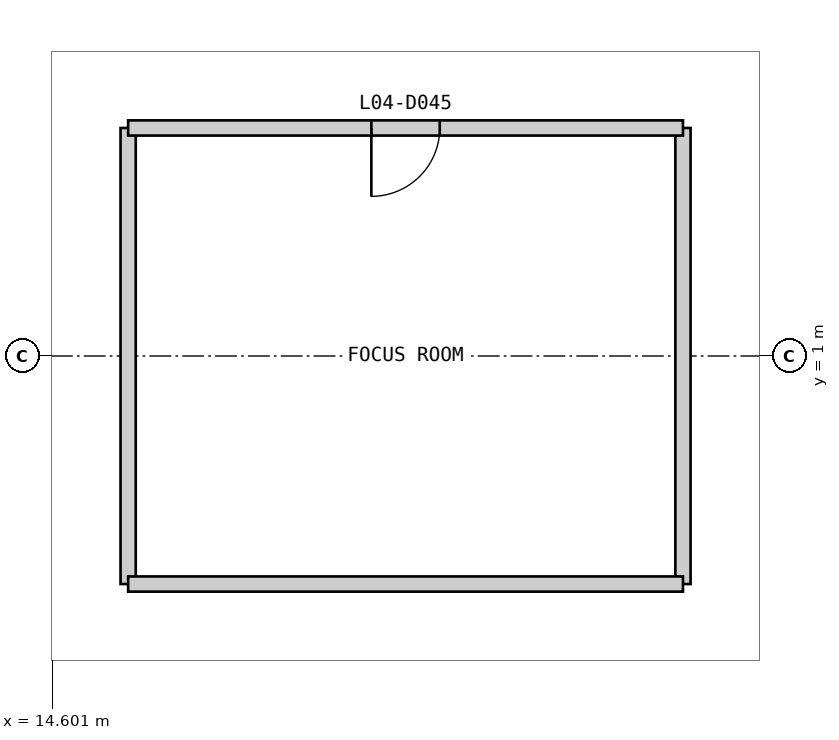
"""IFC4 building model, lengths in metres.
Left out: names, types, materials, properties, quantities, classifications, styles, units other than length and angle.
Written with IfcOpenShell. Run it as: python <this file> out.ifc"""

import sys

from ifc_helpers import new_model, si_unit, direction, frame, frame_2d, origin, place, context, subcontext, project, spatial, rectangle, extrude, element, fill, save


model = new_model("IFC4")
c1 = context("Model", 3, precision=1e-05, world=origin(), true_north=direction((0.0, 1.0)))
c2 = subcontext(c1, "Body", "Model", "MODEL_VIEW")
j1 = project(units=[si_unit("LENGTHUNIT", "METRE"), si_unit("PLANEANGLEUNIT", "RADIAN")], contexts=[c1])
p1 = place(None, origin())
s1 = spatial("IfcSite", under=j1, at=p1, CompositionType="ELEMENT")
p2 = place(p1, origin())
s2 = spatial("IfcBuilding", under=s1, at=p2, CompositionType="ELEMENT")
p3 = place(p2, frame((0.0, 0.0, 21.4)))
s3 = spatial("IfcBuildingStorey", under=s2, at=p3, CompositionType="ELEMENT", Elevation=21.4)
for number, where, z_axis, x_axis in (
    (1, (15.6, -2.0, 0.0), (0.0, 0.0, 1.0), (0.0, 1.0, 0.0)),
    (2, (22.9, -2.0, 0.0), (0.0, 0.0, 1.0), (0.0, 1.0, 0.0)),
):
    element("IfcWall", number, at=place(p3, frame(where, z_axis=z_axis, x_axis=x_axis)), inside=s3, PredefinedType="PARTITIONING", context=c2, shape_type="SweptSolid", body=[
        extrude(rectangle(XDim=6.0, YDim=0.2, at=frame_2d((3.0, 0.0))), origin(), (0.0, 0.0, 1.0), 4.5),
    ])
p4 = place(p3, frame((15.6, -2.0, 0.0), z_axis=(0.0, 0.0, 1.0), x_axis=(1.0, 0.0, 0.0)))
e3 = element("IfcWall", 3, at=p4, inside=s3, PredefinedType="PARTITIONING", context=c2, shape_type="SweptSolid", body=[
    extrude(rectangle(XDim=7.3, YDim=0.2, at=frame_2d((3.65, 0.0))), origin(), (0.0, 0.0, 1.0), 4.5),
])
p5 = place(p3, frame((15.6, 4.0, 0.0), z_axis=(0.0, 0.0, 1.0), x_axis=(1.0, 0.0, 0.0)))
e4 = element("IfcWall", 4, at=p5, inside=s3, PredefinedType="PARTITIONING", context=c2, shape_type="SweptSolid", body=[
    extrude(rectangle(XDim=7.3, YDim=0.2, at=frame_2d((3.65, 0.0))), origin(), (0.0, 0.0, 1.0), 4.5),
])
p6 = place(p5, frame((3.2, 0.0, 0.0)))
e5 = element("IfcOpeningElement", 5, at=p6, cuts=e4, PredefinedType="OPENING", context=c2, shape_type="SweptSolid", body=[
    extrude(rectangle(XDim=0.9, YDim=2.2, at=frame_2d((0.45, 1.1))), frame((0.0, 0.11, 0.0), z_axis=(0.0, -1.0, 0.0), x_axis=(1.0, 0.0, 0.0)), (0.0, 0.0, 1.0), 0.22),
])
p7 = place(p6, frame((0.9, 0.0, 0.0), z_axis=(0.0, 0.0, 1.0), x_axis=(-1.0, 0.0, 0.0)))
e6 = element("IfcDoor", 6, at=p7, inside=s3, OperationType="SINGLE_SWING_RIGHT", PredefinedType="DOOR", context=c2, shape_type="SweptSolid", body=[
    extrude(rectangle(XDim=0.9, YDim=2.2, at=frame_2d((0.45, 1.1))), frame((0.0, 0.025, 0.0), z_axis=(0.0, -1.0, 0.0), x_axis=(1.0, 0.0, 0.0)), (0.0, 0.0, 1.0), 0.05),
])
fill(e5, e6)
save(model, sys.argv[1])
